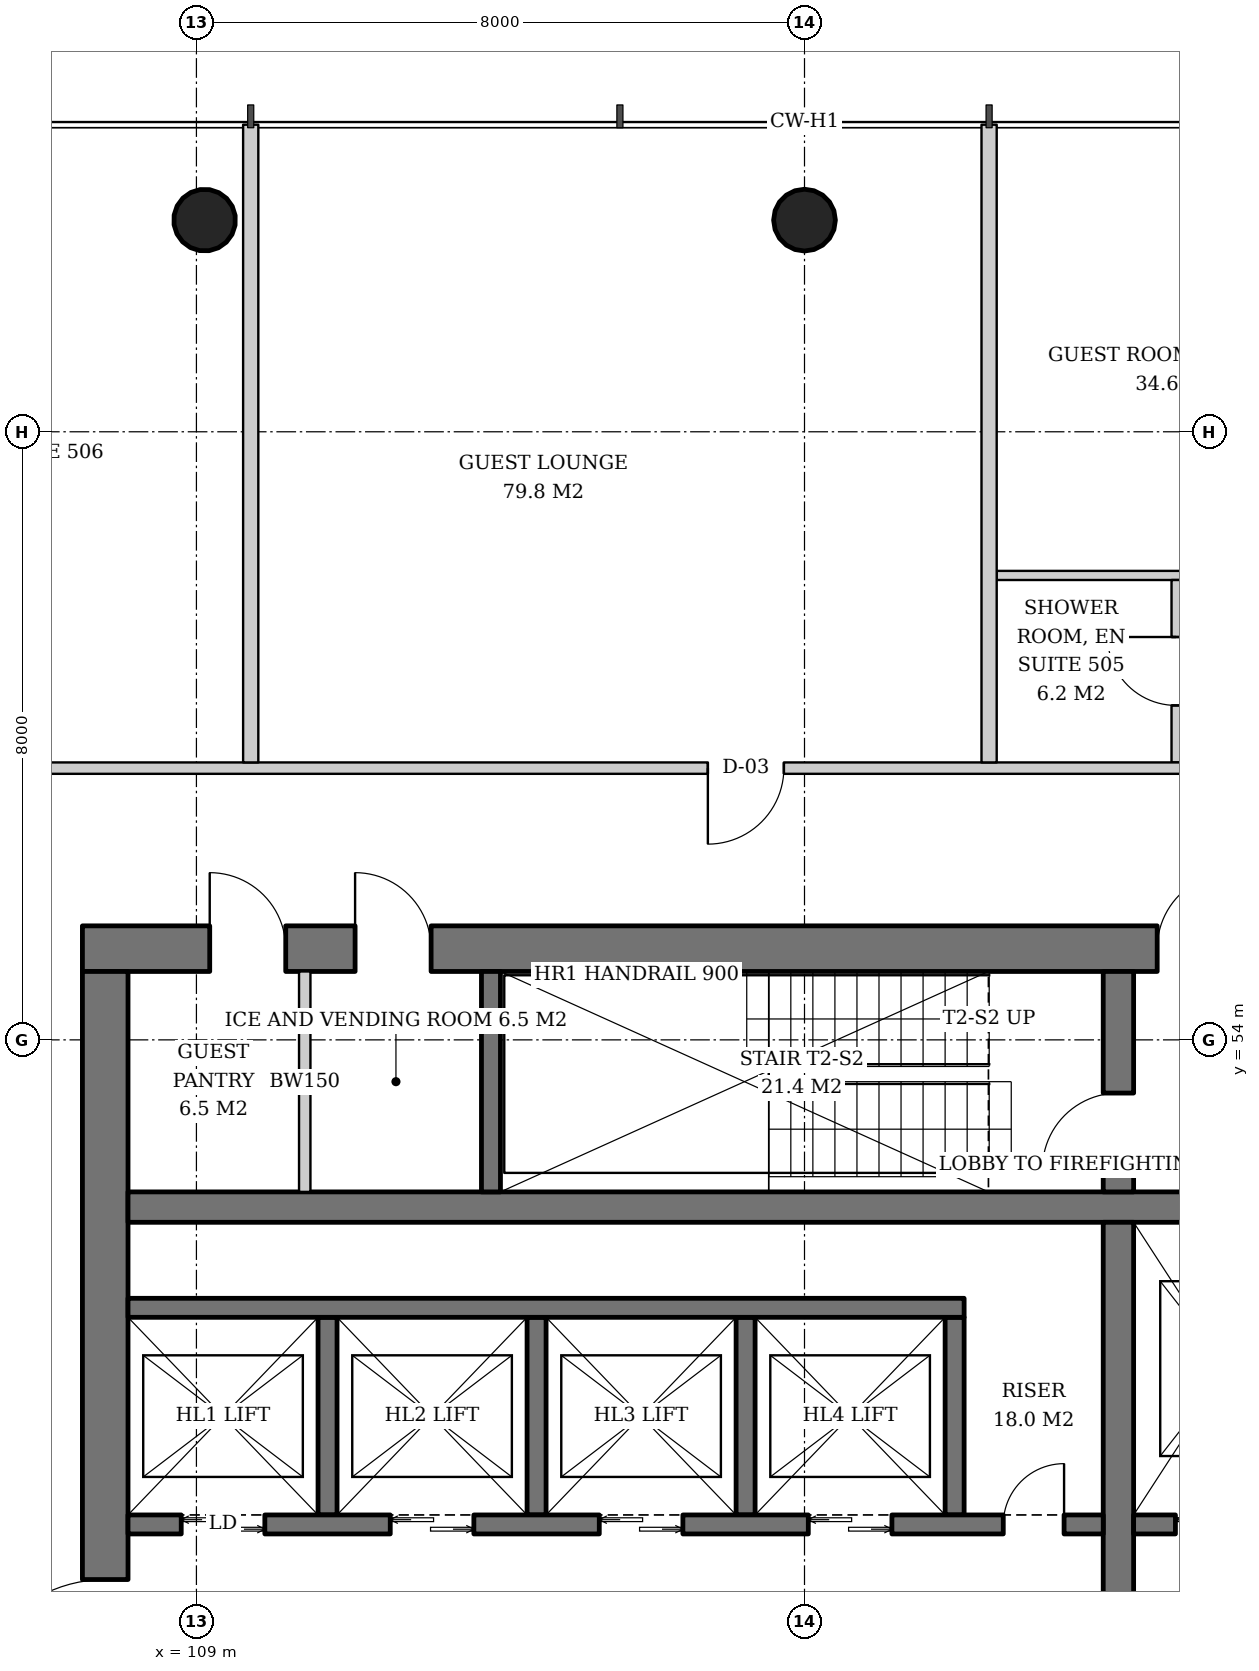
"""IFC4 building model, lengths in metres.
Left out: names, types, materials, properties, quantities, classifications, styles, units other than length and angle.
Written with IfcOpenShell. Run it as: python <this file> out.ifc"""

import sys

from ifc_helpers import new_model, si_unit, direction, frame, frame_2d, origin, origin_2d, place, context, subcontext, project, spatial, rectangle, hollow_circle, extrude, element, fill, save


model = new_model("IFC4")
c1 = context("Model", 3, precision=1e-05, world=origin(), true_north=direction((0.0, 1.0)))
c2 = subcontext(c1, "Body", "Model", "MODEL_VIEW")
j1 = project(units=[si_unit("LENGTHUNIT", "METRE"), si_unit("PLANEANGLEUNIT", "RADIAN")], contexts=[c1])
p1 = place(None, origin())
s1 = spatial("IfcSite", under=j1, at=p1, CompositionType="ELEMENT")
p2 = place(p1, origin())
s2 = spatial("IfcBuilding", under=s1, at=p2, CompositionType="ELEMENT")
p3 = place(p2, frame((0.0, 0.0, 24.8)))
s3 = spatial("IfcBuildingStorey", under=s2, at=p3, CompositionType="ELEMENT", Elevation=24.8)
p4 = place(p3, frame((117.0, 64.836, 0.0), z_axis=(0.0, -0.043069538298, 0.999072076915), x_axis=(1.0, 0.0, 0.0)))
e1 = element("IfcColumn", 1, at=p4, inside=s3, PredefinedType="COLUMN", context=c2, shape_type="SweptSolid", body=[
    extrude(hollow_circle(Radius=0.406, WallThickness=0.03, at=origin_2d()), origin(), (0.0, 0.0, 1.0), 3.803),
])
p5 = place(p3, frame((109.082, 64.836, 0.0), z_axis=(0.021561848751, -0.043059525333, 0.998839808957), x_axis=(0.894160516368, 0.44774654769, 0.0)))
e2 = element("IfcColumn", 2, at=p5, inside=s3, PredefinedType="COLUMN", context=c2, shape_type="SweptSolid", body=[
    extrude(hollow_circle(Radius=0.406, WallThickness=0.03, at=origin_2d()), origin(), (0.0, 0.0, 1.0), 3.804),
])
p6 = place(p3, frame((107.5, 55.2, 0.0), z_axis=(0.0, 0.0, 1.0), x_axis=(1.0, 0.0, 0.0)))
e3 = element("IfcWall", 3, at=p6, inside=s3, PredefinedType="SHEAR", context=c2, shape_type="SweptSolid", body=[
    extrude(rectangle(XDim=19.0, YDim=0.6, at=frame_2d((9.5, 0.0))), origin(), (0.0, 0.0, 1.0), 3.8),
])
p7 = place(p6, frame((14.14, 0.0, 0.0)))
e4 = element("IfcOpeningElement", 4, at=p7, cuts=e3, PredefinedType="OPENING", context=c2, shape_type="SweptSolid", body=[
    extrude(rectangle(XDim=1.0, YDim=2.1, at=frame_2d((0.5, 1.05))), frame((0.0, 0.31, 0.0), z_axis=(0.0, -1.0, 0.0), x_axis=(1.0, 0.0, 0.0)), (0.0, 0.0, 1.0), 0.62),
])
p8 = place(p6, frame((1.675, 0.0, 0.0)))
e5 = element("IfcOpeningElement", 5, at=p8, cuts=e3, PredefinedType="OPENING", context=c2, shape_type="SweptSolid", body=[
    extrude(rectangle(XDim=1.0, YDim=2.1, at=frame_2d((0.5, 1.05))), frame((0.0, 0.31, 0.0), z_axis=(0.0, -1.0, 0.0), x_axis=(1.0, 0.0, 0.0)), (0.0, 0.0, 1.0), 0.62),
])
p9 = place(p6, frame((3.587, 0.0, 0.0)))
e6 = element("IfcOpeningElement", 6, at=p9, cuts=e3, PredefinedType="OPENING", context=c2, shape_type="SweptSolid", body=[
    extrude(rectangle(XDim=1.0, YDim=2.1, at=frame_2d((0.5, 1.05))), frame((0.0, 0.31, 0.0), z_axis=(0.0, -1.0, 0.0), x_axis=(1.0, 0.0, 0.0)), (0.0, 0.0, 1.0), 0.62),
])
p10 = place(p3, frame((107.8, 37.1, 0.0), z_axis=(0.0, 0.0, 1.0), x_axis=(0.0, 1.0, 0.0)))
e7 = element("IfcWall", 7, at=p10, inside=s3, PredefinedType="SHEAR", context=c2, shape_type="SweptSolid", body=[
    extrude(rectangle(XDim=17.8, YDim=0.6, at=frame_2d((8.9, 0.0))), origin(), (0.0, 0.0, 1.0), 3.8),
])
p11 = place(p10, frame((8.0, 0.0, 0.0)))
e8 = element("IfcOpeningElement", 8, at=p11, cuts=e7, PredefinedType="OPENING", context=c2, shape_type="SweptSolid", body=[
    extrude(rectangle(XDim=1.8, YDim=2.4, at=frame_2d((0.9, 1.2))), frame((0.0, 0.31, 0.0), z_axis=(0.0, -1.0, 0.0), x_axis=(1.0, 0.0, 0.0)), (0.0, 0.0, 1.0), 0.62),
])
p12 = place(p3, frame((108.1, 51.8, 0.0), z_axis=(0.0, 0.0, 1.0), x_axis=(1.0, 0.0, 0.0)))
e9 = element("IfcWall", 9, at=p12, inside=s3, PredefinedType="SHEAR", context=c2, shape_type="SweptSolid", body=[
    extrude(rectangle(XDim=17.8, YDim=0.4, at=frame_2d((8.9, 0.0))), origin(), (0.0, 0.0, 1.0), 3.8),
])
p13 = place(p3, frame((121.13, 40.4, 0.0), z_axis=(0.0, 0.0, 1.0), x_axis=(0.0, 1.0, 0.0)))
e10 = element("IfcWall", 10, at=p13, inside=s3, PredefinedType="SHEAR", context=c2, shape_type="SweptSolid", body=[
    extrude(rectangle(XDim=11.2, YDim=0.4, at=frame_2d((5.6, 0.0))), origin(), (0.0, 0.0, 1.0), 3.8),
])
p14 = place(p3, frame((121.13, 52.0, 0.0), z_axis=(0.0, 0.0, 1.0), x_axis=(0.0, 1.0, 0.0)))
e11 = element("IfcWall", 11, at=p14, inside=s3, PredefinedType="SHEAR", context=c2, shape_type="SweptSolid", body=[
    extrude(rectangle(XDim=2.9, YDim=0.4, at=frame_2d((1.45, 0.0))), origin(), (0.0, 0.0, 1.0), 3.8),
])
p15 = place(p14, frame((0.3, 0.0, 0.0)))
e12 = element("IfcOpeningElement", 12, at=p15, cuts=e11, PredefinedType="OPENING", context=c2, shape_type="SweptSolid", body=[
    extrude(rectangle(XDim=1.0, YDim=2.1, at=frame_2d((0.5, 1.05))), frame((0.0, 0.21, 0.0), z_axis=(0.0, -1.0, 0.0), x_axis=(1.0, 0.0, 0.0)), (0.0, 0.0, 1.0), 0.42),
])
p16 = place(p3, frame((112.875, 52.0, 0.0), z_axis=(0.0, 0.0, 1.0), x_axis=(0.0, 1.0, 0.0)))
e13 = element("IfcWall", 13, at=p16, inside=s3, PredefinedType="SHEAR", context=c2, shape_type="SweptSolid", body=[
    extrude(rectangle(XDim=2.9, YDim=0.25, at=frame_2d((1.45, 0.0))), origin(), (0.0, 0.0, 1.0), 3.8),
])
for number, where, z_axis, x_axis in (
    (14, (110.725, 47.75, 0.0), (0.0, 0.0, 1.0), (0.0, 1.0, 0.0)),
    (15, (113.475, 47.75, 0.0), (0.0, 0.0, 1.0), (0.0, 1.0, 0.0)),
    (16, (116.225, 47.75, 0.0), (0.0, 0.0, 1.0), (0.0, 1.0, 0.0)),
    (17, (118.975, 47.75, 0.0), (0.0, 0.0, 1.0), (0.0, 1.0, 0.0)),
):
    element("IfcWall", number, at=place(p3, frame(where, z_axis=z_axis, x_axis=x_axis)), inside=s3, PredefinedType="SHEAR", context=c2, shape_type="SweptSolid", body=[
        extrude(rectangle(XDim=2.6, YDim=0.25, at=frame_2d((1.3, 0.0))), origin(), (0.0, 0.0, 1.0), 3.8),
    ])
p17 = place(p3, frame((108.1, 50.475, 0.0), z_axis=(0.0, 0.0, 1.0), x_axis=(1.0, 0.0, 0.0)))
e18 = element("IfcWall", 18, at=p17, inside=s3, PredefinedType="SHEAR", context=c2, shape_type="SweptSolid", body=[
    extrude(rectangle(XDim=11.0, YDim=0.25, at=frame_2d((5.5, 0.0))), origin(), (0.0, 0.0, 1.0), 3.8),
])
p18 = place(p3, frame((108.1, 47.625, 0.0), z_axis=(0.0, 0.0, 1.0), x_axis=(1.0, 0.0, 0.0)))
e19 = element("IfcWall", 19, at=p18, inside=s3, PredefinedType="SHEAR", context=c2, shape_type="SweptSolid", body=[
    extrude(rectangle(XDim=12.83, YDim=0.25, at=frame_2d((6.415, 0.0))), origin(), (0.0, 0.0, 1.0), 3.8),
])
p19 = place(p18, frame((0.7, 0.0, 0.0)))
e20 = element("IfcOpeningElement", 20, at=p19, cuts=e19, PredefinedType="OPENING", context=c2, shape_type="SweptSolid", body=[
    extrude(rectangle(XDim=1.1, YDim=2.2, at=frame_2d((0.55, 1.1))), frame((0.0, 0.135, 0.0), z_axis=(0.0, -1.0, 0.0), x_axis=(1.0, 0.0, 0.0)), (0.0, 0.0, 1.0), 0.27),
])
p20 = place(p18, frame((3.45, 0.0, 0.0)))
e21 = element("IfcOpeningElement", 21, at=p20, cuts=e19, PredefinedType="OPENING", context=c2, shape_type="SweptSolid", body=[
    extrude(rectangle(XDim=1.1, YDim=2.2, at=frame_2d((0.55, 1.1))), frame((0.0, 0.135, 0.0), z_axis=(0.0, -1.0, 0.0), x_axis=(1.0, 0.0, 0.0)), (0.0, 0.0, 1.0), 0.27),
])
p21 = place(p18, frame((6.2, 0.0, 0.0)))
e22 = element("IfcOpeningElement", 22, at=p21, cuts=e19, PredefinedType="OPENING", context=c2, shape_type="SweptSolid", body=[
    extrude(rectangle(XDim=1.1, YDim=2.2, at=frame_2d((0.55, 1.1))), frame((0.0, 0.135, 0.0), z_axis=(0.0, -1.0, 0.0), x_axis=(1.0, 0.0, 0.0)), (0.0, 0.0, 1.0), 0.27),
])
p22 = place(p18, frame((8.95, 0.0, 0.0)))
e23 = element("IfcOpeningElement", 23, at=p22, cuts=e19, PredefinedType="OPENING", context=c2, shape_type="SweptSolid", body=[
    extrude(rectangle(XDim=1.1, YDim=2.2, at=frame_2d((0.55, 1.1))), frame((0.0, 0.135, 0.0), z_axis=(0.0, -1.0, 0.0), x_axis=(1.0, 0.0, 0.0)), (0.0, 0.0, 1.0), 0.27),
])
p23 = place(p18, frame((11.515, 0.0, 0.0)))
e24 = element("IfcOpeningElement", 24, at=p23, cuts=e19, PredefinedType="OPENING", context=c2, shape_type="SweptSolid", body=[
    extrude(rectangle(XDim=0.8, YDim=2.0, at=frame_2d((0.4, 1.0))), frame((0.0, 0.135, 0.0), z_axis=(0.0, -1.0, 0.0), x_axis=(1.0, 0.0, 0.0)), (0.0, 0.0, 1.0), 0.27),
])
p24 = place(p3, frame((121.33, 47.625, 0.0), z_axis=(0.0, 0.0, 1.0), x_axis=(1.0, 0.0, 0.0)))
e25 = element("IfcWall", 25, at=p24, inside=s3, PredefinedType="SHEAR", context=c2, shape_type="SweptSolid", body=[
    extrude(rectangle(XDim=4.57, YDim=0.25, at=frame_2d((2.285, 0.0))), origin(), (0.0, 0.0, 1.0), 3.8),
])
p25 = place(p24, frame((0.55, 0.0, 0.0)))
e26 = element("IfcOpeningElement", 26, at=p25, cuts=e25, PredefinedType="OPENING", context=c2, shape_type="SweptSolid", body=[
    extrude(rectangle(XDim=1.4, YDim=2.4, at=frame_2d((0.7, 1.2))), frame((0.0, 0.135, 0.0), z_axis=(0.0, -1.0, 0.0), x_axis=(1.0, 0.0, 0.0)), (0.0, 0.0, 1.0), 0.27),
])
p26 = place(p24, frame((3.26, 0.0, 0.0)))
e27 = element("IfcOpeningElement", 27, at=p26, cuts=e25, PredefinedType="OPENING", context=c2, shape_type="SweptSolid", body=[
    extrude(rectangle(XDim=0.8, YDim=2.0, at=frame_2d((0.4, 1.0))), frame((0.0, 0.135, 0.0), z_axis=(0.0, -1.0, 0.0), x_axis=(1.0, 0.0, 0.0)), (0.0, 0.0, 1.0), 0.27),
])
p27 = place(p3, frame((110.425, 52.0, 0.0), z_axis=(0.0, 0.0, 1.0), x_axis=(0.0, 1.0, 0.0)))
e28 = element("IfcWall", 28, at=p27, inside=s3, PredefinedType="SOLIDWALL", context=c2, shape_type="SweptSolid", body=[
    extrude(rectangle(XDim=2.9, YDim=0.15, at=frame_2d((1.45, 0.0))), origin(), (0.0, 0.0, 1.0), 3.6),
])
p28 = place(p3, frame((121.948, 60.11, 0.0), z_axis=(0.0, 0.0, 1.0), x_axis=(-1.0, 0.0, 0.0)))
e29 = element("IfcWall", 29, at=p28, inside=s3, PredefinedType="PARTITIONING", context=c2, shape_type="SweptSolid", body=[
    extrude(rectangle(XDim=2.42, YDim=0.12, at=frame_2d((1.21, 0.0))), origin(), (0.0, 0.0, 1.0), 3.6),
])
p29 = place(p3, frame((121.889, 57.65, 0.0), z_axis=(0.0, 0.0, 1.0), x_axis=(0.0, 1.0, 0.0)))
e30 = element("IfcWall", 30, at=p29, inside=s3, PredefinedType="PARTITIONING", context=c2, shape_type="SweptSolid", body=[
    extrude(rectangle(XDim=2.4, YDim=0.12, at=frame_2d((1.2, 0.0))), origin(), (0.0, 0.0, 1.0), 3.6),
])
p30 = place(p29, frame((0.75, 0.0, 0.0)))
e31 = element("IfcOpeningElement", 31, at=p30, cuts=e30, PredefinedType="OPENING", context=c2, shape_type="SweptSolid", body=[
    extrude(rectangle(XDim=0.9, YDim=2.1, at=frame_2d((0.45, 1.05))), frame((0.0, 0.07, 0.0), z_axis=(0.0, -1.0, 0.0), x_axis=(1.0, 0.0, 0.0)), (0.0, 0.0, 1.0), 0.14),
])
p31 = place(p3, frame((128.65, 57.575, 0.0), z_axis=(0.0, 0.0, 1.0), x_axis=(-1.0, 0.0, 0.0)))
e32 = element("IfcWall", 32, at=p31, inside=s3, PredefinedType="PARTITIONING", context=c2, shape_type="SweptSolid", body=[
    extrude(rectangle(XDim=23.15, YDim=0.15, at=frame_2d((11.575, 0.0))), origin(), (0.0, 0.0, 1.0), 2.8),
])
p32 = place(p31, frame((1.757, 0.0, 0.0)))
e33 = element("IfcOpeningElement", 33, at=p32, cuts=e32, PredefinedType="OPENING", context=c2, shape_type="SweptSolid", body=[
    extrude(rectangle(XDim=0.9, YDim=2.1, at=frame_2d((0.45, 1.05))), frame((0.0, 0.085, 0.0), z_axis=(0.0, -1.0, 0.0), x_axis=(1.0, 0.0, 0.0)), (0.0, 0.0, 1.0), 0.17),
])
p33 = place(p31, frame((5.572, 0.0, 0.0)))
e34 = element("IfcOpeningElement", 34, at=p33, cuts=e32, PredefinedType="OPENING", context=c2, shape_type="SweptSolid", body=[
    extrude(rectangle(XDim=0.9, YDim=2.1, at=frame_2d((0.45, 1.05))), frame((0.0, 0.085, 0.0), z_axis=(0.0, -1.0, 0.0), x_axis=(1.0, 0.0, 0.0)), (0.0, 0.0, 1.0), 0.17),
])
p34 = place(p31, frame((11.921, 0.0, 0.0)))
e35 = element("IfcOpeningElement", 35, at=p34, cuts=e32, PredefinedType="OPENING", context=c2, shape_type="SweptSolid", body=[
    extrude(rectangle(XDim=1.0, YDim=2.1, at=frame_2d((0.5, 1.05))), frame((0.0, 0.085, 0.0), z_axis=(0.0, -1.0, 0.0), x_axis=(1.0, 0.0, 0.0)), (0.0, 0.0, 1.0), 0.17),
])
for number, where, z_axis, x_axis in (
    (36, (119.428, 57.65, 0.0), (0.0, 0.0, 1.0), (0.0, 1.0, 0.0)),
    (37, (109.714, 57.65, 0.0), (0.0, 0.0, 1.0), (0.0, 1.0, 0.0)),
):
    element("IfcWall", number, at=place(p3, frame(where, z_axis=z_axis, x_axis=x_axis)), inside=s3, PredefinedType="PARTITIONING", context=c2, shape_type="SweptSolid", body=[
        extrude(rectangle(XDim=8.39, YDim=0.2, at=frame_2d((4.195, 0.0))), origin(), (0.0, 0.0, 1.0), 3.05),
    ])
p35 = place(p19, origin())
e38 = element("IfcDoor", 38, at=p35, inside=s3, OperationType="DOUBLE_DOOR_SLIDING", PredefinedType="DOOR", context=c2, shape_type="SweptSolid", body=[
    extrude(rectangle(XDim=1.1, YDim=2.2, at=frame_2d((0.55, 1.1))), frame((0.0, 0.025, 0.0), z_axis=(0.0, -1.0, 0.0), x_axis=(1.0, 0.0, 0.0)), (0.0, 0.0, 1.0), 0.05),
])
fill(e20, e38)
p36 = place(p20, origin())
e39 = element("IfcDoor", 39, at=p36, inside=s3, OperationType="DOUBLE_DOOR_SLIDING", PredefinedType="DOOR", context=c2, shape_type="SweptSolid", body=[
    extrude(rectangle(XDim=1.1, YDim=2.2, at=frame_2d((0.55, 1.1))), frame((0.0, 0.025, 0.0), z_axis=(0.0, -1.0, 0.0), x_axis=(1.0, 0.0, 0.0)), (0.0, 0.0, 1.0), 0.05),
])
fill(e21, e39)
p37 = place(p21, origin())
e40 = element("IfcDoor", 40, at=p37, inside=s3, OperationType="DOUBLE_DOOR_SLIDING", PredefinedType="DOOR", context=c2, shape_type="SweptSolid", body=[
    extrude(rectangle(XDim=1.1, YDim=2.2, at=frame_2d((0.55, 1.1))), frame((0.0, 0.025, 0.0), z_axis=(0.0, -1.0, 0.0), x_axis=(1.0, 0.0, 0.0)), (0.0, 0.0, 1.0), 0.05),
])
fill(e22, e40)
p38 = place(p22, origin())
e41 = element("IfcDoor", 41, at=p38, inside=s3, OperationType="DOUBLE_DOOR_SLIDING", PredefinedType="DOOR", context=c2, shape_type="SweptSolid", body=[
    extrude(rectangle(XDim=1.1, YDim=2.2, at=frame_2d((0.55, 1.1))), frame((0.0, 0.025, 0.0), z_axis=(0.0, -1.0, 0.0), x_axis=(1.0, 0.0, 0.0)), (0.0, 0.0, 1.0), 0.05),
])
fill(e23, e41)
p39 = place(p23, origin())
e42 = element("IfcDoor", 42, at=p39, inside=s3, OperationType="SINGLE_SWING_RIGHT", PredefinedType="DOOR", context=c2, shape_type="SweptSolid", body=[
    extrude(rectangle(XDim=0.8, YDim=2.0, at=frame_2d((0.4, 1.0))), frame((0.0, 0.025, 0.0), z_axis=(0.0, -1.0, 0.0), x_axis=(1.0, 0.0, 0.0)), (0.0, 0.0, 1.0), 0.05),
])
fill(e24, e42)
p40 = place(p25, origin())
e43 = element("IfcDoor", 43, at=p40, inside=s3, OperationType="DOUBLE_DOOR_SLIDING", PredefinedType="DOOR", context=c2, shape_type="SweptSolid", body=[
    extrude(rectangle(XDim=1.4, YDim=2.4, at=frame_2d((0.7, 1.2))), frame((0.0, 0.025, 0.0), z_axis=(0.0, -1.0, 0.0), x_axis=(1.0, 0.0, 0.0)), (0.0, 0.0, 1.0), 0.05),
])
fill(e26, e43)
p41 = place(p15, origin())
e44 = element("IfcDoor", 44, at=p41, inside=s3, OperationType="SINGLE_SWING_LEFT", PredefinedType="DOOR", context=c2, shape_type="SweptSolid", body=[
    extrude(rectangle(XDim=1.0, YDim=2.1, at=frame_2d((0.5, 1.05))), frame((0.0, 0.025, 0.0), z_axis=(0.0, -1.0, 0.0), x_axis=(1.0, 0.0, 0.0)), (0.0, 0.0, 1.0), 0.05),
])
fill(e12, e44)
p42 = place(p7, origin())
e45 = element("IfcDoor", 45, at=p42, inside=s3, OperationType="SINGLE_SWING_RIGHT", PredefinedType="DOOR", context=c2, shape_type="SweptSolid", body=[
    extrude(rectangle(XDim=1.0, YDim=2.1, at=frame_2d((0.5, 1.05))), frame((0.0, 0.025, 0.0), z_axis=(0.0, -1.0, 0.0), x_axis=(1.0, 0.0, 0.0)), (0.0, 0.0, 1.0), 0.05),
])
fill(e4, e45)
p43 = place(p11, origin())
e46 = element("IfcDoor", 46, at=p43, inside=s3, OperationType="DOUBLE_DOOR_SINGLE_SWING", PredefinedType="DOOR", context=c2, shape_type="SweptSolid", body=[
    extrude(rectangle(XDim=1.8, YDim=2.4, at=frame_2d((0.9, 1.2))), frame((0.0, 0.025, 0.0), z_axis=(0.0, -1.0, 0.0), x_axis=(1.0, 0.0, 0.0)), (0.0, 0.0, 1.0), 0.05),
])
fill(e8, e46)
p44 = place(p8, origin())
e47 = element("IfcDoor", 47, at=p44, inside=s3, OperationType="SINGLE_SWING_LEFT", PredefinedType="DOOR", context=c2, shape_type="SweptSolid", body=[
    extrude(rectangle(XDim=1.0, YDim=2.1, at=frame_2d((0.5, 1.05))), frame((0.0, -0.24, 0.0), z_axis=(0.0, -1.0, 0.0), x_axis=(1.0, 0.0, 0.0)), (0.0, 0.0, 1.0), 0.05),
])
fill(e5, e47)
p45 = place(p9, origin())
e48 = element("IfcDoor", 48, at=p45, inside=s3, OperationType="SINGLE_SWING_LEFT", PredefinedType="DOOR", context=c2, shape_type="SweptSolid", body=[
    extrude(rectangle(XDim=1.0, YDim=2.1, at=frame_2d((0.5, 1.05))), frame((0.0, -0.24, 0.0), z_axis=(0.0, -1.0, 0.0), x_axis=(1.0, 0.0, 0.0)), (0.0, 0.0, 1.0), 0.05),
])
fill(e6, e48)
p46 = place(p30, origin())
e49 = element("IfcDoor", 49, at=p46, inside=s3, OperationType="SINGLE_SWING_RIGHT", PredefinedType="DOOR", context=c2, shape_type="SweptSolid", body=[
    extrude(rectangle(XDim=0.9, YDim=2.1, at=frame_2d((0.45, 1.05))), frame((0.0, 0.025, 0.0), z_axis=(0.0, -1.0, 0.0), x_axis=(1.0, 0.0, 0.0)), (0.0, 0.0, 1.0), 0.05),
])
fill(e31, e49)
p47 = place(p34, origin())
e50 = element("IfcDoor", 50, at=p47, inside=s3, OperationType="SINGLE_SWING_RIGHT", PredefinedType="DOOR", context=c2, shape_type="SweptSolid", body=[
    extrude(rectangle(XDim=1.0, YDim=2.1, at=frame_2d((0.5, 1.05))), frame((0.0, 0.025, 0.0), z_axis=(0.0, -1.0, 0.0), x_axis=(1.0, 0.0, 0.0)), (0.0, 0.0, 1.0), 0.05),
])
fill(e35, e50)
save(model, sys.argv[1])
